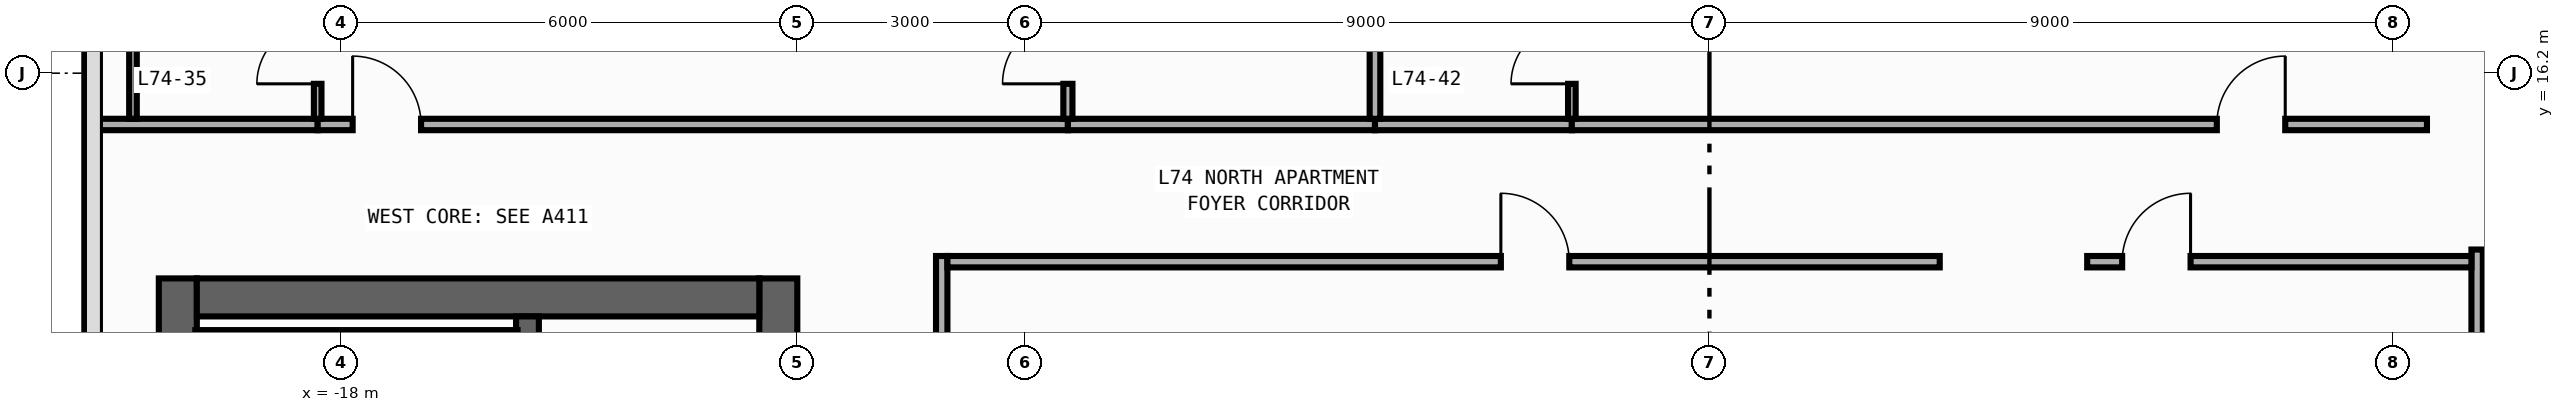
"""IFC4 building model, lengths in metres.
Left out: names, types, materials, properties, quantities, classifications, styles, units other than length and angle.
Written with IfcOpenShell. Run it as: python <this file> out.ifc"""

import sys

from ifc_helpers import new_model, si_unit, direction, frame, frame_2d, origin, place, context, subcontext, project, spatial, rectangle, extrude, element, fill, save


model = new_model("IFC4")
c1 = context("Model", 3, precision=1e-05, world=origin(), true_north=direction((0.0, 1.0)))
c2 = subcontext(c1, "Body", "Model", "MODEL_VIEW")
j1 = project(units=[si_unit("LENGTHUNIT", "METRE"), si_unit("PLANEANGLEUNIT", "RADIAN")], contexts=[c1])
p1 = place(None, origin())
s1 = spatial("IfcSite", under=j1, at=p1, CompositionType="ELEMENT")
p2 = place(p1, origin())
s2 = spatial("IfcBuilding", under=s1, at=p2, CompositionType="ELEMENT")
p3 = place(p2, frame((0.0, 0.0, 308.0)))
s3 = spatial("IfcBuildingStorey", under=s2, at=p3, CompositionType="ELEMENT", Elevation=308.0)
p4 = place(p3, frame((-20.15, -13.5, 0.0), z_axis=(0.0, 0.0, 1.0), x_axis=(0.0, 1.0, 0.0)))
e1 = element("IfcWall", 1, at=p4, inside=s3, PredefinedType="SHEAR", context=c2, shape_type="SweptSolid", body=[
    extrude(rectangle(XDim=27.0, YDim=0.5, at=frame_2d((13.5, 0.0))), origin(), (0.0, 0.0, 1.0), 3.54),
])
p5 = place(p3, frame((-12.25, -13.5, 0.0), z_axis=(0.0, 0.0, 1.0), x_axis=(0.0, 1.0, 0.0)))
e2 = element("IfcWall", 2, at=p5, inside=s3, PredefinedType="SHEAR", context=c2, shape_type="SweptSolid", body=[
    extrude(rectangle(XDim=27.0, YDim=0.5, at=frame_2d((13.5, 0.0))), origin(), (0.0, 0.0, 1.0), 3.54),
])
p6 = place(p5, frame((15.175, 0.0, 0.0)))
e3 = element("IfcOpeningElement", 3, at=p6, cuts=e2, PredefinedType="OPENING", context=c2, shape_type="SweptSolid", body=[
    extrude(rectangle(XDim=0.85, YDim=2.1, at=frame_2d((0.425, 1.05))), frame((0.0, 0.26, 0.0), z_axis=(0.0, -1.0, 0.0), x_axis=(1.0, 0.0, 0.0)), (0.0, 0.0, 1.0), 0.52),
])
p7 = place(p5, frame((21.275, 0.0, 0.0)))
e4 = element("IfcOpeningElement", 4, at=p7, cuts=e2, PredefinedType="OPENING", context=c2, shape_type="SweptSolid", body=[
    extrude(rectangle(XDim=0.85, YDim=2.1, at=frame_2d((0.425, 1.05))), frame((0.0, 0.26, 0.0), z_axis=(0.0, -1.0, 0.0), x_axis=(1.0, 0.0, 0.0)), (0.0, 0.0, 1.0), 0.52),
])
p8 = place(p5, frame((4.275, 0.0, 0.0)))
e5 = element("IfcOpeningElement", 5, at=p8, cuts=e2, PredefinedType="OPENING", context=c2, shape_type="SweptSolid", body=[
    extrude(rectangle(XDim=0.85, YDim=2.1, at=frame_2d((0.425, 1.05))), frame((0.0, 0.26, 0.0), z_axis=(0.0, -1.0, 0.0), x_axis=(1.0, 0.0, 0.0)), (0.0, 0.0, 1.0), 0.52),
])
p9 = place(p5, frame((10.275, 0.0, 0.0)))
e6 = element("IfcOpeningElement", 6, at=p9, cuts=e2, PredefinedType="OPENING", context=c2, shape_type="SweptSolid", body=[
    extrude(rectangle(XDim=0.85, YDim=2.1, at=frame_2d((0.425, 1.05))), frame((0.0, 0.26, 0.0), z_axis=(0.0, -1.0, 0.0), x_axis=(1.0, 0.0, 0.0)), (0.0, 0.0, 1.0), 0.52),
])
p10 = place(p5, frame((12.725, 0.0, 0.0)))
e7 = element("IfcOpeningElement", 7, at=p10, cuts=e2, PredefinedType="OPENING", context=c2, shape_type="SweptSolid", body=[
    extrude(rectangle(XDim=1.15, YDim=2.2, at=frame_2d((0.575, 1.1))), frame((0.0, 0.26, 0.0), z_axis=(0.0, -1.0, 0.0), x_axis=(1.0, 0.0, 0.0)), (0.0, 0.0, 1.0), 0.52),
])
p11 = place(p5, frame((1.625, 0.0, 0.0)))
e8 = element("IfcOpeningElement", 8, at=p11, cuts=e2, PredefinedType="OPENING", context=c2, shape_type="SweptSolid", body=[
    extrude(rectangle(XDim=0.85, YDim=2.1, at=frame_2d((0.425, 1.05))), frame((0.0, 0.26, 0.0), z_axis=(0.0, -1.0, 0.0), x_axis=(1.0, 0.0, 0.0)), (0.0, 0.0, 1.0), 0.52),
])
p12 = place(p3, frame((-19.9, 13.25, 0.0), z_axis=(0.0, 0.0, 1.0), x_axis=(1.0, 0.0, 0.0)))
e9 = element("IfcWall", 9, at=p12, inside=s3, PredefinedType="SHEAR", context=c2, shape_type="SweptSolid", body=[
    extrude(rectangle(XDim=7.4, YDim=0.5, at=frame_2d((3.7, 0.0))), origin(), (0.0, 0.0, 1.0), 3.54),
])
p13 = place(p3, frame((-15.55, -13.0, 0.0), z_axis=(0.0, 0.0, 1.0), x_axis=(0.0, 1.0, 0.0)))
e10 = element("IfcWall", 10, at=p13, inside=s3, PredefinedType="SHEAR", context=c2, shape_type="SweptSolid", body=[
    extrude(rectangle(XDim=26.0, YDim=0.3, at=frame_2d((13.0, 0.0))), origin(), (0.0, 0.0, 1.0), 3.54),
])
p14 = place(p13, frame((12.225, 0.0, 0.0)))
e11 = element("IfcOpeningElement", 11, at=p14, cuts=e10, PredefinedType="OPENING", context=c2, shape_type="SweptSolid", body=[
    extrude(rectangle(XDim=1.15, YDim=2.2, at=frame_2d((0.575, 1.1))), frame((0.0, 0.16, 0.0), z_axis=(0.0, -1.0, 0.0), x_axis=(1.0, 0.0, 0.0)), (0.0, 0.0, 1.0), 0.32),
])
p15 = place(p13, frame((1.125, 0.0, 0.0)))
e12 = element("IfcOpeningElement", 12, at=p15, cuts=e10, PredefinedType="OPENING", context=c2, shape_type="SweptSolid", body=[
    extrude(rectangle(XDim=0.85, YDim=2.1, at=frame_2d((0.425, 1.05))), frame((0.0, 0.16, 0.0), z_axis=(0.0, -1.0, 0.0), x_axis=(1.0, 0.0, 0.0)), (0.0, 0.0, 1.0), 0.32),
])
p16 = place(p3, frame((-19.92, 12.71, 0.0), z_axis=(0.0, 0.0, 1.0), x_axis=(1.0, 0.0, 0.0)))
e13 = element("IfcWall", 13, at=p16, inside=s3, PredefinedType="SHEAR", context=c2, shape_type="SweptSolid", body=[
    extrude(rectangle(XDim=4.24, YDim=0.22, at=frame_2d((2.12, 0.0))), origin(), (0.0, 0.0, 1.0), 3.54),
])
p17 = place(p3, frame((-10.1, 4.79, 0.0), z_axis=(0.0, 0.0, 1.0), x_axis=(0.0, 1.0, 0.0)))
e14 = element("IfcWall", 14, at=p17, inside=s3, PredefinedType="PARTITIONING", context=c2, shape_type="SweptSolid", body=[
    extrude(rectangle(XDim=9.005, YDim=0.15, at=frame_2d((4.502, 0.0))), origin(), (0.0, 0.0, 1.0), 3.54),
])
p18 = place(p17, frame((0.46, 0.0, 0.0)))
e15 = element("IfcOpeningElement", 15, at=p18, cuts=e14, PredefinedType="OPENING", context=c2, shape_type="SweptSolid", body=[
    extrude(rectangle(XDim=0.9, YDim=2.15, at=frame_2d((0.45, 1.075))), frame((0.0, 0.085, 0.0), z_axis=(0.0, -1.0, 0.0), x_axis=(1.0, 0.0, 0.0)), (0.0, 0.0, 1.0), 0.17),
])
p19 = place(p3, frame((10.1, 4.79, 0.0), z_axis=(0.0, 0.0, 1.0), x_axis=(0.0, 1.0, 0.0)))
e16 = element("IfcWall", 16, at=p19, inside=s3, PredefinedType="PARTITIONING", context=c2, shape_type="SweptSolid", body=[
    extrude(rectangle(XDim=9.09, YDim=0.15, at=frame_2d((4.545, 0.0))), origin(), (0.0, 0.0, 1.0), 3.54),
])
p20 = place(p19, frame((0.46, 0.0, 0.0)))
e17 = element("IfcOpeningElement", 17, at=p20, cuts=e16, PredefinedType="OPENING", context=c2, shape_type="SweptSolid", body=[
    extrude(rectangle(XDim=0.9, YDim=2.15, at=frame_2d((0.45, 1.075))), frame((0.0, 0.085, 0.0), z_axis=(0.0, -1.0, 0.0), x_axis=(1.0, 0.0, 0.0)), (0.0, 0.0, 1.0), 0.17),
])
p21 = place(p3, frame((-21.255, 15.525, 0.0), z_axis=(0.0, 0.0, 1.0), x_axis=(1.0, 0.0, 0.0)))
e18 = element("IfcWall", 18, at=p21, inside=s3, PredefinedType="PARTITIONING", context=c2, shape_type="SweptSolid", body=[
    extrude(rectangle(XDim=2.945, YDim=0.15, at=frame_2d((1.472, 0.0))), origin(), (0.0, 0.0, 1.0), 3.54),
])
p22 = place(p3, frame((-18.31, 15.525, 0.0), z_axis=(0.0, 0.0, 1.0), x_axis=(1.0, 0.0, 0.0)))
e19 = element("IfcWall", 19, at=p22, inside=s3, PredefinedType="PARTITIONING", context=c2, shape_type="SweptSolid", body=[
    extrude(rectangle(XDim=9.87, YDim=0.15, at=frame_2d((4.935, 0.0))), origin(), (0.0, 0.0, 1.0), 3.54),
])
p23 = place(p22, frame((0.46, 0.0, 0.0)))
e20 = element("IfcOpeningElement", 20, at=p23, cuts=e19, PredefinedType="OPENING", context=c2, shape_type="SweptSolid", body=[
    extrude(rectangle(XDim=0.9, YDim=2.15, at=frame_2d((0.45, 1.075))), frame((0.0, 0.085, 0.0), z_axis=(0.0, -1.0, 0.0), x_axis=(1.0, 0.0, 0.0)), (0.0, 0.0, 1.0), 0.17),
])
p24 = place(p3, frame((-8.44, 15.525, 0.0), z_axis=(0.0, 0.0, 1.0), x_axis=(1.0, 0.0, 0.0)))
e21 = element("IfcWall", 21, at=p24, inside=s3, PredefinedType="PARTITIONING", context=c2, shape_type="SweptSolid", body=[
    extrude(rectangle(XDim=4.04, YDim=0.15, at=frame_2d((2.02, 0.0))), origin(), (0.0, 0.0, 1.0), 3.54),
])
p25 = place(p3, frame((-4.4, 15.525, 0.0), z_axis=(0.0, 0.0, 1.0), x_axis=(1.0, 0.0, 0.0)))
e22 = element("IfcWall", 22, at=p25, inside=s3, PredefinedType="PARTITIONING", context=c2, shape_type="SweptSolid", body=[
    extrude(rectangle(XDim=2.59, YDim=0.15, at=frame_2d((1.295, 0.0))), origin(), (0.0, 0.0, 1.0), 3.54),
])
p26 = place(p3, frame((-1.81, 15.525, 0.0), z_axis=(0.0, 0.0, 1.0), x_axis=(1.0, 0.0, 0.0)))
e23 = element("IfcWall", 23, at=p26, inside=s3, PredefinedType="PARTITIONING", context=c2, shape_type="SweptSolid", body=[
    extrude(rectangle(XDim=11.25, YDim=0.15, at=frame_2d((5.625, 0.0))), origin(), (0.0, 0.0, 1.0), 3.54),
])
p27 = place(p26, frame((8.486, 0.0, 0.0)))
e24 = element("IfcOpeningElement", 24, at=p27, cuts=e23, PredefinedType="OPENING", context=c2, shape_type="SweptSolid", body=[
    extrude(rectangle(XDim=0.9, YDim=2.15, at=frame_2d((0.45, 1.075))), frame((0.0, 0.085, 0.0), z_axis=(0.0, -1.0, 0.0), x_axis=(1.0, 0.0, 0.0)), (0.0, 0.0, 1.0), 0.17),
])
p28 = place(p3, frame((-10.025, 13.72, 0.0), z_axis=(0.0, 0.0, 1.0), x_axis=(1.0, 0.0, 0.0)))
e25 = element("IfcWall", 25, at=p28, inside=s3, PredefinedType="PARTITIONING", context=c2, shape_type="SweptSolid", body=[
    extrude(rectangle(XDim=13.055, YDim=0.15, at=frame_2d((6.527, 0.0))), origin(), (0.0, 0.0, 1.0), 3.54),
])
p29 = place(p28, frame((7.281, 0.0, 0.0)))
e26 = element("IfcOpeningElement", 26, at=p29, cuts=e25, PredefinedType="OPENING", context=c2, shape_type="SweptSolid", body=[
    extrude(rectangle(XDim=0.9, YDim=2.15, at=frame_2d((0.45, 1.075))), frame((0.0, 0.085, 0.0), z_axis=(0.0, -1.0, 0.0), x_axis=(1.0, 0.0, 0.0)), (0.0, 0.0, 1.0), 0.17),
])
p30 = place(p3, frame((4.97, 13.72, 0.0), z_axis=(0.0, 0.0, 1.0), x_axis=(1.0, 0.0, 0.0)))
e27 = element("IfcWall", 27, at=p30, inside=s3, PredefinedType="PARTITIONING", context=c2, shape_type="SweptSolid", body=[
    extrude(rectangle(XDim=5.055, YDim=0.15, at=frame_2d((2.527, 0.0))), origin(), (0.0, 0.0, 1.0), 3.54),
])
p31 = place(p30, frame((0.46, 0.0, 0.0)))
e28 = element("IfcOpeningElement", 28, at=p31, cuts=e27, PredefinedType="OPENING", context=c2, shape_type="SweptSolid", body=[
    extrude(rectangle(XDim=0.9, YDim=2.15, at=frame_2d((0.45, 1.075))), frame((0.0, 0.085, 0.0), z_axis=(0.0, -1.0, 0.0), x_axis=(1.0, 0.0, 0.0)), (0.0, 0.0, 1.0), 0.17),
])
p32 = place(p3, frame((-18.31, 15.6, 0.0), z_axis=(0.0, 0.0, 1.0), x_axis=(0.0, 1.0, 0.0)))
e29 = element("IfcWall", 29, at=p32, inside=s3, PredefinedType="PARTITIONING", context=c2, shape_type="SweptSolid", body=[
    extrude(rectangle(XDim=2.5, YDim=0.1, at=frame_2d((1.25, 0.0))), origin(), (0.0, 0.0, 1.0), 3.54),
])
p33 = place(p32, frame((0.46, 0.0, 0.0)))
e30 = element("IfcOpeningElement", 30, at=p33, cuts=e29, PredefinedType="OPENING", context=c2, shape_type="SweptSolid", body=[
    extrude(rectangle(XDim=0.8, YDim=2.1, at=frame_2d((0.4, 1.05))), frame((0.0, 0.06, 0.0), z_axis=(0.0, -1.0, 0.0), x_axis=(1.0, 0.0, 0.0)), (0.0, 0.0, 1.0), 0.12),
])
p34 = place(p3, frame((-8.44, 15.6, 0.0), z_axis=(0.0, 0.0, 1.0), x_axis=(0.0, 1.0, 0.0)))
e31 = element("IfcWall", 31, at=p34, inside=s3, PredefinedType="PARTITIONING", context=c2, shape_type="SweptSolid", body=[
    extrude(rectangle(XDim=4.5, YDim=0.12, at=frame_2d((2.25, 0.0))), origin(), (0.0, 0.0, 1.0), 3.54),
])
p35 = place(p34, frame((0.46, 0.0, 0.0)))
e32 = element("IfcOpeningElement", 32, at=p35, cuts=e31, PredefinedType="OPENING", context=c2, shape_type="SweptSolid", body=[
    extrude(rectangle(XDim=0.86, YDim=2.15, at=frame_2d((0.43, 1.075))), frame((0.0, 0.07, 0.0), z_axis=(0.0, -1.0, 0.0), x_axis=(1.0, 0.0, 0.0)), (0.0, 0.0, 1.0), 0.14),
])
p36 = place(p3, frame((-4.4, 15.6, 0.0), z_axis=(0.0, 0.0, 1.0), x_axis=(0.0, 1.0, 0.0)))
e33 = element("IfcWall", 33, at=p36, inside=s3, PredefinedType="PARTITIONING", context=c2, shape_type="SweptSolid", body=[
    extrude(rectangle(XDim=2.5, YDim=0.14, at=frame_2d((1.25, 0.0))), origin(), (0.0, 0.0, 1.0), 3.54),
])
p37 = place(p3, frame((-1.81, 15.6, 0.0), z_axis=(0.0, 0.0, 1.0), x_axis=(0.0, 1.0, 0.0)))
e34 = element("IfcWall", 34, at=p37, inside=s3, PredefinedType="PARTITIONING", context=c2, shape_type="SweptSolid", body=[
    extrude(rectangle(XDim=2.5, YDim=0.1, at=frame_2d((1.25, 0.0))), origin(), (0.0, 0.0, 1.0), 3.54),
])
p38 = place(p37, frame((0.46, 0.0, 0.0)))
e35 = element("IfcOpeningElement", 35, at=p38, cuts=e34, PredefinedType="OPENING", context=c2, shape_type="SweptSolid", body=[
    extrude(rectangle(XDim=0.8, YDim=2.1, at=frame_2d((0.4, 1.05))), frame((0.0, 0.06, 0.0), z_axis=(0.0, -1.0, 0.0), x_axis=(1.0, 0.0, 0.0)), (0.0, 0.0, 1.0), 0.12),
])
p39 = place(p3, frame((-20.74, 15.6, 0.0), z_axis=(0.0, 0.0, 1.0), x_axis=(0.0, 1.0, 0.0)))
e36 = element("IfcWall", 36, at=p39, inside=s3, PredefinedType="PARTITIONING", context=c2, shape_type="SweptSolid", body=[
    extrude(rectangle(XDim=2.45, YDim=0.1, at=frame_2d((1.225, 0.0))), origin(), (0.0, 0.0, 1.0), 3.54),
])
p40 = place(p23, origin())
e37 = element("IfcDoor", 37, at=p40, inside=s3, OperationType="SINGLE_SWING_LEFT", PredefinedType="DOOR", context=c2, shape_type="SweptSolid", body=[
    extrude(rectangle(XDim=0.9, YDim=2.15, at=frame_2d((0.45, 1.075))), frame((0.0, 0.025, 0.0), z_axis=(0.0, -1.0, 0.0), x_axis=(1.0, 0.0, 0.0)), (0.0, 0.0, 1.0), 0.05),
])
fill(e20, e37)
p41 = place(p27, origin())
e38 = element("IfcDoor", 38, at=p41, inside=s3, OperationType="SINGLE_SWING_RIGHT", PredefinedType="DOOR", context=c2, shape_type="SweptSolid", body=[
    extrude(rectangle(XDim=0.9, YDim=2.15, at=frame_2d((0.45, 1.075))), frame((0.0, 0.025, 0.0), z_axis=(0.0, -1.0, 0.0), x_axis=(1.0, 0.0, 0.0)), (0.0, 0.0, 1.0), 0.05),
])
fill(e24, e38)
p42 = place(p29, origin())
e39 = element("IfcDoor", 39, at=p42, inside=s3, OperationType="SINGLE_SWING_LEFT", PredefinedType="DOOR", context=c2, shape_type="SweptSolid", body=[
    extrude(rectangle(XDim=0.9, YDim=2.15, at=frame_2d((0.45, 1.075))), frame((0.0, 0.025, 0.0), z_axis=(0.0, -1.0, 0.0), x_axis=(1.0, 0.0, 0.0)), (0.0, 0.0, 1.0), 0.05),
])
fill(e26, e39)
p43 = place(p31, origin())
e40 = element("IfcDoor", 40, at=p43, inside=s3, OperationType="SINGLE_SWING_RIGHT", PredefinedType="DOOR", context=c2, shape_type="SweptSolid", body=[
    extrude(rectangle(XDim=0.9, YDim=2.15, at=frame_2d((0.45, 1.075))), frame((0.0, 0.025, 0.0), z_axis=(0.0, -1.0, 0.0), x_axis=(1.0, 0.0, 0.0)), (0.0, 0.0, 1.0), 0.05),
])
fill(e28, e40)
p44 = place(p33, origin())
e41 = element("IfcDoor", 41, at=p44, inside=s3, OperationType="SINGLE_SWING_LEFT", PredefinedType="DOOR", context=c2, shape_type="SweptSolid", body=[
    extrude(rectangle(XDim=0.8, YDim=2.1, at=frame_2d((0.4, 1.05))), frame((0.0, 0.025, 0.0), z_axis=(0.0, -1.0, 0.0), x_axis=(1.0, 0.0, 0.0)), (0.0, 0.0, 1.0), 0.05),
])
fill(e30, e41)
p45 = place(p35, origin())
e42 = element("IfcDoor", 42, at=p45, inside=s3, OperationType="SINGLE_SWING_LEFT", PredefinedType="DOOR", context=c2, shape_type="SweptSolid", body=[
    extrude(rectangle(XDim=0.86, YDim=2.15, at=frame_2d((0.43, 1.075))), frame((0.0, 0.025, 0.0), z_axis=(0.0, -1.0, 0.0), x_axis=(1.0, 0.0, 0.0)), (0.0, 0.0, 1.0), 0.05),
])
fill(e32, e42)
p46 = place(p38, origin())
e43 = element("IfcDoor", 43, at=p46, inside=s3, OperationType="SINGLE_SWING_LEFT", PredefinedType="DOOR", context=c2, shape_type="SweptSolid", body=[
    extrude(rectangle(XDim=0.8, YDim=2.1, at=frame_2d((0.4, 1.05))), frame((0.0, 0.025, 0.0), z_axis=(0.0, -1.0, 0.0), x_axis=(1.0, 0.0, 0.0)), (0.0, 0.0, 1.0), 0.05),
])
fill(e35, e43)
save(model, sys.argv[1])
